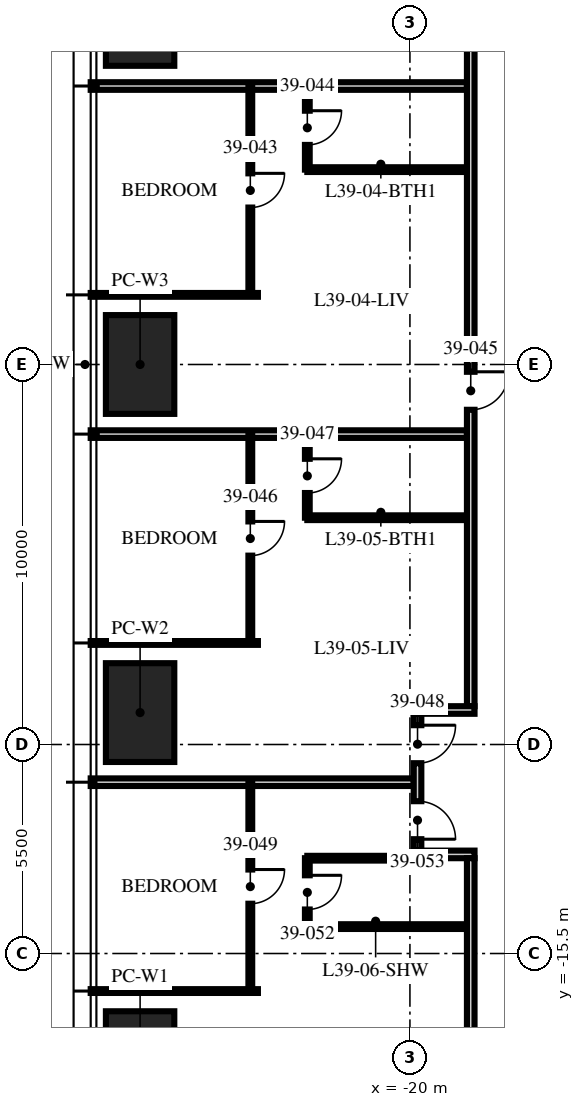
"""IFC4 building model, lengths in metres.
Left out: names, types, materials, properties, quantities, classifications, styles, units other than length and angle.
Written with IfcOpenShell. Run it as: python <this file> out.ifc"""

import sys

from ifc_helpers import new_model, si_unit, direction, frame, frame_2d, origin, origin_2d, place, context, subcontext, project, spatial, rectangle, extrude, element, fill, save


model = new_model("IFC4")
c1 = context("Model", 3, precision=1e-05, world=origin(), true_north=direction((0.0, 1.0)))
c2 = subcontext(c1, "Body", "Model", "MODEL_VIEW")
j1 = project(units=[si_unit("LENGTHUNIT", "METRE"), si_unit("PLANEANGLEUNIT", "RADIAN")], contexts=[c1])
p1 = place(None, origin())
s1 = spatial("IfcSite", under=j1, at=p1, CompositionType="ELEMENT")
p2 = place(p1, origin())
s2 = spatial("IfcBuilding", under=s1, at=p2, CompositionType="ELEMENT")
p3 = place(p2, frame((0.0, 0.0, 156.0)))
s3 = spatial("IfcBuildingStorey", under=s2, at=p3, CompositionType="ELEMENT", Elevation=156.0)
for number, where, z_axis, x_axis in (
    (1, (-27.1, -18.32, 0.0), (0.0, 0.0, 1.0), (0.0, 1.0, 0.0)),
    (2, (-27.1, -9.16, 0.0), (0.0, 0.0, 1.0), (0.0, 1.0, 0.0)),
    (3, (-27.1, 0.0, 0.0), (0.0, 0.0, 1.0), (0.0, 1.0, 0.0)),
    (4, (-27.1, 9.16, 0.0), (0.0, 0.0, 1.0), (0.0, 1.0, 0.0)),
):
    element("IfcColumn", number, at=place(p3, frame(where, z_axis=z_axis, x_axis=x_axis)), inside=s3, PredefinedType="COLUMN", context=c2, shape_type="SweptSolid", body=[
        extrude(rectangle(XDim=2.6, YDim=1.8, at=origin_2d()), origin(), (0.0, 0.0, 1.0), 3.75),
    ])
p4 = place(p3, frame((-18.5, 7.328, 0.0), z_axis=(0.0, 0.0, 1.0), x_axis=(-1.0, 0.0, 0.0)))
e5 = element("IfcWall", 5, at=p4, inside=s3, PredefinedType="PARTITIONING", context=c2, shape_type="SweptSolid", body=[
    extrude(rectangle(XDim=9.9, YDim=0.2, at=frame_2d((4.95, 0.0))), origin(), (0.0, 0.0, 1.0), 2.81),
])
p5 = place(p3, frame((-24.0, 1.832, 0.0), z_axis=(0.0, 0.0, 1.0), x_axis=(-1.0, 0.0, 0.0)))
e6 = element("IfcWall", 6, at=p5, inside=s3, PredefinedType="PARTITIONING", context=c2, shape_type="SweptSolid", body=[
    extrude(rectangle(XDim=4.4, YDim=0.1, at=frame_2d((2.2, 0.0))), origin(), (0.0, 0.0, 1.0), 2.81),
])
p6 = place(p3, frame((-18.5, -1.832, 0.0), z_axis=(0.0, 0.0, 1.0), x_axis=(-1.0, 0.0, 0.0)))
e7 = element("IfcWall", 7, at=p6, inside=s3, PredefinedType="PARTITIONING", context=c2, shape_type="SweptSolid", body=[
    extrude(rectangle(XDim=9.9, YDim=0.2, at=frame_2d((4.95, 0.0))), origin(), (0.0, 0.0, 1.0), 2.81),
])
p7 = place(p3, frame((-24.0, -7.328, 0.0), z_axis=(0.0, 0.0, 1.0), x_axis=(-1.0, 0.0, 0.0)))
e8 = element("IfcWall", 8, at=p7, inside=s3, PredefinedType="PARTITIONING", context=c2, shape_type="SweptSolid", body=[
    extrude(rectangle(XDim=4.4, YDim=0.1, at=frame_2d((2.2, 0.0))), origin(), (0.0, 0.0, 1.0), 2.81),
])
p8 = place(p3, frame((-19.9, -10.992, 0.0), z_axis=(0.0, 0.0, 1.0), x_axis=(-1.0, 0.0, 0.0)))
e9 = element("IfcWall", 9, at=p8, inside=s3, PredefinedType="PARTITIONING", context=c2, shape_type="SweptSolid", body=[
    extrude(rectangle(XDim=8.5, YDim=0.2, at=frame_2d((4.25, 0.0))), origin(), (0.0, 0.0, 1.0), 2.81),
])
p9 = place(p3, frame((-24.0, -16.488, 0.0), z_axis=(0.0, 0.0, 1.0), x_axis=(-1.0, 0.0, 0.0)))
e10 = element("IfcWall", 10, at=p9, inside=s3, PredefinedType="PARTITIONING", context=c2, shape_type="SweptSolid", body=[
    extrude(rectangle(XDim=4.4, YDim=0.1, at=frame_2d((2.2, 0.0))), origin(), (0.0, 0.0, 1.0), 2.81),
])
p10 = place(p3, frame((-24.2, 7.328, 0.0), z_axis=(0.0, 0.0, 1.0), x_axis=(0.0, -1.0, 0.0)))
e11 = element("IfcWall", 11, at=p10, inside=s3, PredefinedType="PARTITIONING", context=c2, shape_type="SweptSolid", body=[
    extrude(rectangle(XDim=5.496, YDim=0.1, at=frame_2d((2.748, 0.0))), origin(), (0.0, 0.0, 1.0), 2.81),
])
p11 = place(p10, frame((2.298, 0.0, 0.0)))
e12 = element("IfcOpeningElement", 12, at=p11, cuts=e11, PredefinedType="OPENING", context=c2, shape_type="SweptSolid", body=[
    extrude(rectangle(XDim=0.9, YDim=2.1, at=frame_2d((0.45, 1.05))), frame((0.0, 0.06, 0.0), z_axis=(0.0, -1.0, 0.0), x_axis=(1.0, 0.0, 0.0)), (0.0, 0.0, 1.0), 0.12),
])
p12 = place(p3, frame((-22.7, 7.328, 0.0), z_axis=(0.0, 0.0, 1.0), x_axis=(0.0, -1.0, 0.0)))
e13 = element("IfcWall", 13, at=p12, inside=s3, PredefinedType="PARTITIONING", context=c2, shape_type="SweptSolid", body=[
    extrude(rectangle(XDim=2.2, YDim=0.125, at=frame_2d((1.1, 0.0))), origin(), (0.0, 0.0, 1.0), 3.5),
])
p13 = place(p12, frame((0.65, 0.0, 0.0)))
e14 = element("IfcOpeningElement", 14, at=p13, cuts=e13, PredefinedType="OPENING", context=c2, shape_type="SweptSolid", body=[
    extrude(rectangle(XDim=0.9, YDim=2.1, at=frame_2d((0.45, 1.05))), frame((0.0, 0.073, 0.0), z_axis=(0.0, -1.0, 0.0), x_axis=(1.0, 0.0, 0.0)), (0.0, 0.0, 1.0), 0.145),
])
p14 = place(p3, frame((-18.5, 5.128, 0.0), z_axis=(0.0, 0.0, 1.0), x_axis=(-1.0, 0.0, 0.0)))
e15 = element("IfcWall", 15, at=p14, inside=s3, PredefinedType="PARTITIONING", context=c2, shape_type="SweptSolid", body=[
    extrude(rectangle(XDim=4.2, YDim=0.125, at=frame_2d((2.1, 0.0))), origin(), (0.0, 0.0, 1.0), 3.5),
])
p15 = place(p3, frame((-24.2, -1.832, 0.0), z_axis=(0.0, 0.0, 1.0), x_axis=(0.0, -1.0, 0.0)))
e16 = element("IfcWall", 16, at=p15, inside=s3, PredefinedType="PARTITIONING", context=c2, shape_type="SweptSolid", body=[
    extrude(rectangle(XDim=5.496, YDim=0.1, at=frame_2d((2.748, 0.0))), origin(), (0.0, 0.0, 1.0), 2.81),
])
p16 = place(p15, frame((2.298, 0.0, 0.0)))
e17 = element("IfcOpeningElement", 17, at=p16, cuts=e16, PredefinedType="OPENING", context=c2, shape_type="SweptSolid", body=[
    extrude(rectangle(XDim=0.9, YDim=2.1, at=frame_2d((0.45, 1.05))), frame((0.0, 0.06, 0.0), z_axis=(0.0, -1.0, 0.0), x_axis=(1.0, 0.0, 0.0)), (0.0, 0.0, 1.0), 0.12),
])
p17 = place(p3, frame((-22.7, -1.832, 0.0), z_axis=(0.0, 0.0, 1.0), x_axis=(0.0, -1.0, 0.0)))
e18 = element("IfcWall", 18, at=p17, inside=s3, PredefinedType="PARTITIONING", context=c2, shape_type="SweptSolid", body=[
    extrude(rectangle(XDim=2.2, YDim=0.125, at=frame_2d((1.1, 0.0))), origin(), (0.0, 0.0, 1.0), 3.5),
])
p18 = place(p17, frame((0.65, 0.0, 0.0)))
e19 = element("IfcOpeningElement", 19, at=p18, cuts=e18, PredefinedType="OPENING", context=c2, shape_type="SweptSolid", body=[
    extrude(rectangle(XDim=0.9, YDim=2.1, at=frame_2d((0.45, 1.05))), frame((0.0, 0.073, 0.0), z_axis=(0.0, -1.0, 0.0), x_axis=(1.0, 0.0, 0.0)), (0.0, 0.0, 1.0), 0.145),
])
p19 = place(p3, frame((-18.5, -4.032, 0.0), z_axis=(0.0, 0.0, 1.0), x_axis=(-1.0, 0.0, 0.0)))
e20 = element("IfcWall", 20, at=p19, inside=s3, PredefinedType="PARTITIONING", context=c2, shape_type="SweptSolid", body=[
    extrude(rectangle(XDim=4.2, YDim=0.125, at=frame_2d((2.1, 0.0))), origin(), (0.0, 0.0, 1.0), 3.5),
])
p20 = place(p3, frame((-24.2, -10.992, 0.0), z_axis=(0.0, 0.0, 1.0), x_axis=(0.0, -1.0, 0.0)))
e21 = element("IfcWall", 21, at=p20, inside=s3, PredefinedType="PARTITIONING", context=c2, shape_type="SweptSolid", body=[
    extrude(rectangle(XDim=5.496, YDim=0.1, at=frame_2d((2.748, 0.0))), origin(), (0.0, 0.0, 1.0), 2.81),
])
p21 = place(p20, frame((2.298, 0.0, 0.0)))
e22 = element("IfcOpeningElement", 22, at=p21, cuts=e21, PredefinedType="OPENING", context=c2, shape_type="SweptSolid", body=[
    extrude(rectangle(XDim=0.9, YDim=2.1, at=frame_2d((0.45, 1.05))), frame((0.0, 0.06, 0.0), z_axis=(0.0, -1.0, 0.0), x_axis=(1.0, 0.0, 0.0)), (0.0, 0.0, 1.0), 0.12),
])
p22 = place(p3, frame((-22.7, -12.992, 0.0), z_axis=(0.0, 0.0, 1.0), x_axis=(0.0, -1.0, 0.0)))
e23 = element("IfcWall", 23, at=p22, inside=s3, PredefinedType="PARTITIONING", context=c2, shape_type="SweptSolid", body=[
    extrude(rectangle(XDim=1.8, YDim=0.125, at=frame_2d((0.9, 0.0))), origin(), (0.0, 0.0, 1.0), 2.81),
])
p23 = place(p22, frame((0.45, 0.0, 0.0)))
e24 = element("IfcOpeningElement", 24, at=p23, cuts=e23, PredefinedType="OPENING", context=c2, shape_type="SweptSolid", body=[
    extrude(rectangle(XDim=0.9, YDim=2.1, at=frame_2d((0.45, 1.05))), frame((0.0, 0.073, 0.0), z_axis=(0.0, -1.0, 0.0), x_axis=(1.0, 0.0, 0.0)), (0.0, 0.0, 1.0), 0.145),
])
p24 = place(p3, frame((-19.97, -12.992, 0.0), z_axis=(0.0, 0.0, 1.0), x_axis=(-1.0, 0.0, 0.0)))
e25 = element("IfcWall", 25, at=p24, inside=s3, PredefinedType="PARTITIONING", context=c2, shape_type="SweptSolid", body=[
    extrude(rectangle(XDim=2.73, YDim=0.125, at=frame_2d((1.365, 0.0))), origin(), (0.0, 0.0, 1.0), 3.5),
])
p25 = place(p3, frame((-18.5, -14.792, 0.0), z_axis=(0.0, 0.0, 1.0), x_axis=(-1.0, 0.0, 0.0)))
e26 = element("IfcWall", 26, at=p25, inside=s3, PredefinedType="PARTITIONING", context=c2, shape_type="SweptSolid", body=[
    extrude(rectangle(XDim=4.2, YDim=0.125, at=frame_2d((2.1, 0.0))), origin(), (0.0, 0.0, 1.0), 3.5),
])
p26 = place(p3, frame((-18.4, 18.3, 0.0), z_axis=(0.0, 0.0, 1.0), x_axis=(0.0, -1.0, 0.0)))
e27 = element("IfcWall", 27, at=p26, inside=s3, PredefinedType="PARTITIONING", context=c2, shape_type="SweptSolid", body=[
    extrude(rectangle(XDim=27.292, YDim=0.2, at=frame_2d((13.646, 0.0))), origin(), (0.0, 0.0, 1.0), 2.3),
])
p27 = place(p26, frame((18.492, 0.0, 0.0)))
e28 = element("IfcOpeningElement", 28, at=p27, cuts=e27, PredefinedType="OPENING", context=c2, shape_type="SweptSolid", body=[
    extrude(rectangle(XDim=1.0, YDim=2.2, at=frame_2d((0.5, 1.1))), frame((0.0, 0.11, 0.0), z_axis=(0.0, -1.0, 0.0), x_axis=(1.0, 0.0, 0.0)), (0.0, 0.0, 1.0), 0.22),
])
p28 = place(p3, frame((-18.3, -9.092, 0.0), z_axis=(0.0, 0.0, 1.0), x_axis=(-1.0, 0.0, 0.0)))
e29 = element("IfcWall", 29, at=p28, inside=s3, PredefinedType="PARTITIONING", context=c2, shape_type="SweptSolid", body=[
    extrude(rectangle(XDim=1.6, YDim=0.2, at=frame_2d((0.8, 0.0))), origin(), (0.0, 0.0, 1.0), 2.7),
])
p29 = place(p3, frame((-18.3, -12.892, 0.0), z_axis=(0.0, 0.0, 1.0), x_axis=(-1.0, 0.0, 0.0)))
e30 = element("IfcWall", 30, at=p29, inside=s3, PredefinedType="PARTITIONING", context=c2, shape_type="SweptSolid", body=[
    extrude(rectangle(XDim=1.6, YDim=0.2, at=frame_2d((0.8, 0.0))), origin(), (0.0, 0.0, 1.0), 3.5),
])
p30 = place(p3, frame((-19.8, -9.192, 0.0), z_axis=(0.0, 0.0, 1.0), x_axis=(0.0, -1.0, 0.0)))
e31 = element("IfcWall", 31, at=p30, inside=s3, PredefinedType="PARTITIONING", context=c2, shape_type="SweptSolid", body=[
    extrude(rectangle(XDim=3.6, YDim=0.2, at=frame_2d((1.8, 0.0))), origin(), (0.0, 0.0, 1.0), 2.7),
])
p31 = place(p30, frame((0.3, 0.0, 0.0)))
e32 = element("IfcOpeningElement", 32, at=p31, cuts=e31, PredefinedType="OPENING", context=c2, shape_type="SweptSolid", body=[
    extrude(rectangle(XDim=1.0, YDim=2.2, at=frame_2d((0.5, 1.1))), frame((0.0, 0.11, 0.0), z_axis=(0.0, -1.0, 0.0), x_axis=(1.0, 0.0, 0.0)), (0.0, 0.0, 1.0), 0.22),
])
p32 = place(p30, frame((2.3, 0.0, 0.0)))
e33 = element("IfcOpeningElement", 33, at=p32, cuts=e31, PredefinedType="OPENING", context=c2, shape_type="SweptSolid", body=[
    extrude(rectangle(XDim=1.0, YDim=2.2, at=frame_2d((0.5, 1.1))), frame((0.0, 0.11, 0.0), z_axis=(0.0, -1.0, 0.0), x_axis=(1.0, 0.0, 0.0)), (0.0, 0.0, 1.0), 0.22),
])
p33 = place(p3, frame((-18.4, -12.992, 0.0), z_axis=(0.0, 0.0, 1.0), x_axis=(0.0, -1.0, 0.0)))
e34 = element("IfcWall", 34, at=p33, inside=s3, PredefinedType="PARTITIONING", context=c2, shape_type="SweptSolid", body=[
    extrude(rectangle(XDim=5.308, YDim=0.2, at=frame_2d((2.654, 0.0))), origin(), (0.0, 0.0, 1.0), 2.3),
])
p34 = place(p11, origin())
e35 = element("IfcDoor", 35, at=p34, inside=s3, OperationType="SINGLE_SWING_LEFT", PredefinedType="DOOR", context=c2, shape_type="SweptSolid", body=[
    extrude(rectangle(XDim=0.9, YDim=2.1, at=frame_2d((0.45, 1.05))), frame((0.0, 0.025, 0.0), z_axis=(0.0, -1.0, 0.0), x_axis=(1.0, 0.0, 0.0)), (0.0, 0.0, 1.0), 0.05),
])
fill(e12, e35)
p35 = place(p13, origin())
e36 = element("IfcDoor", 36, at=p35, inside=s3, OperationType="SINGLE_SWING_LEFT", PredefinedType="DOOR", context=c2, shape_type="SweptSolid", body=[
    extrude(rectangle(XDim=0.9, YDim=2.1, at=frame_2d((0.45, 1.05))), frame((0.0, 0.025, 0.0), z_axis=(0.0, -1.0, 0.0), x_axis=(1.0, 0.0, 0.0)), (0.0, 0.0, 1.0), 0.05),
])
fill(e14, e36)
p36 = place(p27, origin())
e37 = element("IfcDoor", 37, at=p36, inside=s3, OperationType="SINGLE_SWING_LEFT", PredefinedType="DOOR", context=c2, shape_type="SweptSolid", body=[
    extrude(rectangle(XDim=1.0, YDim=2.2, at=frame_2d((0.5, 1.1))), frame((0.0, 0.025, 0.0), z_axis=(0.0, -1.0, 0.0), x_axis=(1.0, 0.0, 0.0)), (0.0, 0.0, 1.0), 0.05),
])
fill(e28, e37)
p37 = place(p16, origin())
e38 = element("IfcDoor", 38, at=p37, inside=s3, OperationType="SINGLE_SWING_LEFT", PredefinedType="DOOR", context=c2, shape_type="SweptSolid", body=[
    extrude(rectangle(XDim=0.9, YDim=2.1, at=frame_2d((0.45, 1.05))), frame((0.0, 0.025, 0.0), z_axis=(0.0, -1.0, 0.0), x_axis=(1.0, 0.0, 0.0)), (0.0, 0.0, 1.0), 0.05),
])
fill(e17, e38)
p38 = place(p18, origin())
e39 = element("IfcDoor", 39, at=p38, inside=s3, OperationType="SINGLE_SWING_LEFT", PredefinedType="DOOR", context=c2, shape_type="SweptSolid", body=[
    extrude(rectangle(XDim=0.9, YDim=2.1, at=frame_2d((0.45, 1.05))), frame((0.0, 0.025, 0.0), z_axis=(0.0, -1.0, 0.0), x_axis=(1.0, 0.0, 0.0)), (0.0, 0.0, 1.0), 0.05),
])
fill(e19, e39)
p39 = place(p31, origin())
e40 = element("IfcDoor", 40, at=p39, inside=s3, OperationType="SINGLE_SWING_LEFT", PredefinedType="DOOR", context=c2, shape_type="SweptSolid", body=[
    extrude(rectangle(XDim=1.0, YDim=2.2, at=frame_2d((0.5, 1.1))), frame((0.0, 0.025, 0.0), z_axis=(0.0, -1.0, 0.0), x_axis=(1.0, 0.0, 0.0)), (0.0, 0.0, 1.0), 0.05),
])
fill(e32, e40)
p40 = place(p21, origin())
e41 = element("IfcDoor", 41, at=p40, inside=s3, OperationType="SINGLE_SWING_LEFT", PredefinedType="DOOR", context=c2, shape_type="SweptSolid", body=[
    extrude(rectangle(XDim=0.9, YDim=2.1, at=frame_2d((0.45, 1.05))), frame((0.0, 0.025, 0.0), z_axis=(0.0, -1.0, 0.0), x_axis=(1.0, 0.0, 0.0)), (0.0, 0.0, 1.0), 0.05),
])
fill(e22, e41)
p41 = place(p23, origin())
e42 = element("IfcDoor", 42, at=p41, inside=s3, OperationType="SINGLE_SWING_LEFT", PredefinedType="DOOR", context=c2, shape_type="SweptSolid", body=[
    extrude(rectangle(XDim=0.9, YDim=2.1, at=frame_2d((0.45, 1.05))), frame((0.0, 0.025, 0.0), z_axis=(0.0, -1.0, 0.0), x_axis=(1.0, 0.0, 0.0)), (0.0, 0.0, 1.0), 0.05),
])
fill(e24, e42)
p42 = place(p32, origin())
e43 = element("IfcDoor", 43, at=p42, inside=s3, OperationType="SINGLE_SWING_RIGHT", PredefinedType="DOOR", context=c2, shape_type="SweptSolid", body=[
    extrude(rectangle(XDim=1.0, YDim=2.2, at=frame_2d((0.5, 1.1))), frame((0.0, 0.025, 0.0), z_axis=(0.0, -1.0, 0.0), x_axis=(1.0, 0.0, 0.0)), (0.0, 0.0, 1.0), 0.05),
])
fill(e33, e43)
save(model, sys.argv[1])
